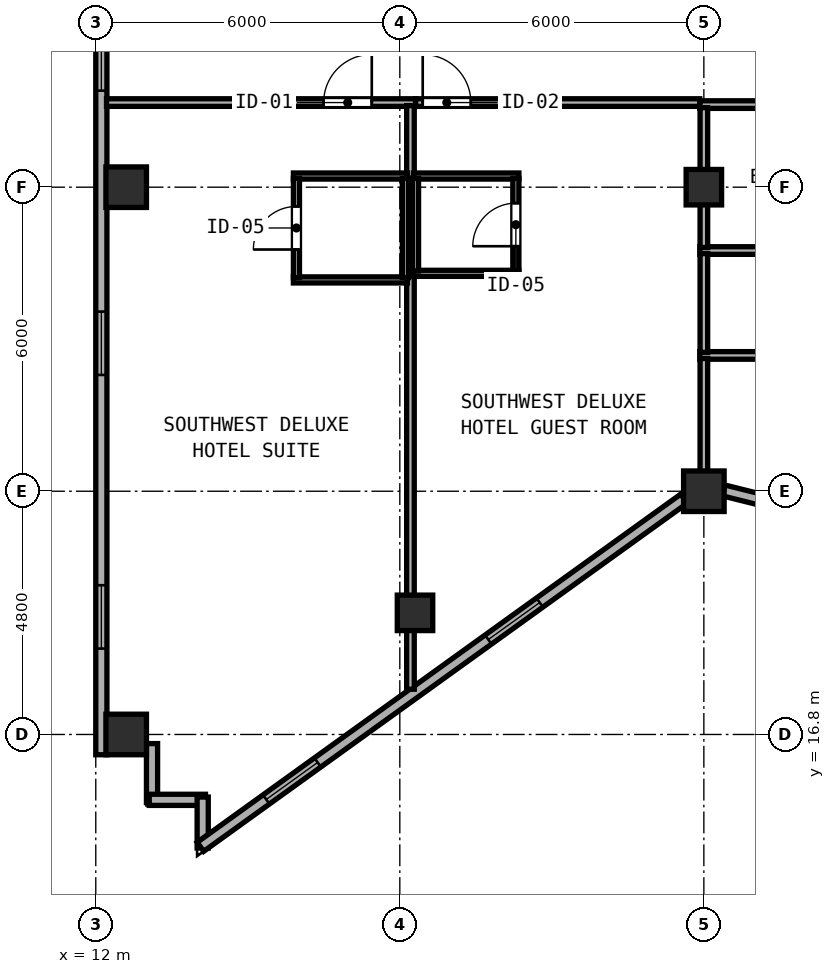
"""IFC4 building model, lengths in metres.
Left out: names, types, materials, properties, quantities, classifications, styles, units other than length and angle.
Written with IfcOpenShell. Run it as: python <this file> out.ifc"""

import sys

from ifc_helpers import new_model, si_unit, direction, frame, frame_2d, origin, origin_2d, place, context, subcontext, project, spatial, rectangle, hollow_rectangle, extrude, element, fill, save


model = new_model("IFC4")
c1 = context("Model", 3, precision=1e-05, world=origin(), true_north=direction((0.0, 1.0)))
c2 = subcontext(c1, "Body", "Model", "MODEL_VIEW")
j1 = project(units=[si_unit("LENGTHUNIT", "METRE"), si_unit("PLANEANGLEUNIT", "RADIAN")], contexts=[c1])
p1 = place(None, origin())
s1 = spatial("IfcSite", under=j1, at=p1, CompositionType="ELEMENT")
p2 = place(p1, origin())
s2 = spatial("IfcBuilding", under=s1, at=p2, CompositionType="ELEMENT")
p3 = place(p2, frame((0.0, 0.0, 235.2)))
s3 = spatial("IfcBuildingStorey", under=s2, at=p3, CompositionType="ELEMENT", Elevation=235.2)
for number, where, z_axis, x_axis in (
    (1, (24.0, 21.6, 0.0), (0.0, 0.0, 1.0), (1.0, 0.0, 0.0)),
    (2, (12.6, 16.8, 0.0), (0.0, 0.0, 1.0), (1.0, 0.0, 0.0)),
    (3, (12.6, 27.6, 0.0), (0.0, 0.0, 1.0), (1.0, 0.0, 0.0)),
):
    element("IfcColumn", number, at=place(p3, frame(where, z_axis=z_axis, x_axis=x_axis)), inside=s3, PredefinedType="COLUMN", context=c2, shape_type="SweptSolid", body=[
        extrude(hollow_rectangle(XDim=0.8, YDim=0.8, WallThickness=0.03, at=origin_2d()), origin(), (0.0, 0.0, 1.0), 3.85),
    ])
for number, where, z_axis, x_axis in (
    (4, (24.0, 27.6, 0.0), (0.0, 0.0, 1.0), (1.0, 0.0, 0.0)),
    (5, (18.3, 19.2, 0.0), (0.0, 0.0, 1.0), (1.0, 0.0, 0.0)),
):
    element("IfcColumn", number, at=place(p3, frame(where, z_axis=z_axis, x_axis=x_axis)), inside=s3, PredefinedType="COLUMN", context=c2, shape_type="SweptSolid", body=[
        extrude(hollow_rectangle(XDim=0.7, YDim=0.7, WallThickness=0.026, at=origin_2d()), origin(), (0.0, 0.0, 1.0), 3.85),
    ])
p4 = place(p3, frame((12.11, 37.545, 0.0), z_axis=(0.0, 0.0, 1.0), x_axis=(0.0, -1.0, 0.0)))
e6 = element("IfcWall", 6, at=p4, inside=s3, PredefinedType="SOLIDWALL", context=c2, shape_type="SweptSolid", body=[
    extrude(rectangle(XDim=21.145, YDim=0.22, at=frame_2d((10.573, 0.0))), origin(), (0.0, 0.0, 1.0), 3.67),
])
p5 = place(p4, frame((1.6, 0.0, 0.85)))
e7 = element("IfcOpeningElement", 7, at=p5, cuts=e6, PredefinedType="OPENING", context=c2, shape_type="SweptSolid", body=[
    extrude(rectangle(XDim=1.25, YDim=1.95, at=frame_2d((0.625, 0.975))), frame((0.0, 0.12, 0.0), z_axis=(0.0, -1.0, 0.0), x_axis=(1.0, 0.0, 0.0)), (0.0, 0.0, 1.0), 0.24),
])
p6 = place(p4, frame((6.79, 0.0, 0.85)))
e8 = element("IfcOpeningElement", 8, at=p6, cuts=e6, PredefinedType="OPENING", context=c2, shape_type="SweptSolid", body=[
    extrude(rectangle(XDim=1.25, YDim=1.95, at=frame_2d((0.625, 0.975))), frame((0.0, 0.12, 0.0), z_axis=(0.0, -1.0, 0.0), x_axis=(1.0, 0.0, 0.0)), (0.0, 0.0, 1.0), 0.24),
])
p7 = place(p4, frame((12.4, 0.0, 0.85)))
e9 = element("IfcOpeningElement", 9, at=p7, cuts=e6, PredefinedType="OPENING", context=c2, shape_type="SweptSolid", body=[
    extrude(rectangle(XDim=1.25, YDim=1.95, at=frame_2d((0.625, 0.975))), frame((0.0, 0.12, 0.0), z_axis=(0.0, -1.0, 0.0), x_axis=(1.0, 0.0, 0.0)), (0.0, 0.0, 1.0), 0.24),
])
p8 = place(p4, frame((17.8, 0.0, 0.85)))
e10 = element("IfcOpeningElement", 10, at=p8, cuts=e6, PredefinedType="OPENING", context=c2, shape_type="SweptSolid", body=[
    extrude(rectangle(XDim=1.25, YDim=1.95, at=frame_2d((0.625, 0.975))), frame((0.0, 0.12, 0.0), z_axis=(0.0, -1.0, 0.0), x_axis=(1.0, 0.0, 0.0)), (0.0, 0.0, 1.0), 0.24),
])
p9 = place(p3, frame((13.11, 16.62, 0.0), z_axis=(0.0, 0.0, 1.0), x_axis=(0.0, -1.0, 0.0)))
e11 = element("IfcWall", 11, at=p9, inside=s3, PredefinedType="SOLIDWALL", context=c2, shape_type="SweptSolid", body=[
    extrude(rectangle(XDim=1.165, YDim=0.22, at=frame_2d((0.583, 0.0))), origin(), (0.0, 0.0, 1.0), 3.67),
])
p10 = place(p3, frame((13.055, 15.51, 0.0), z_axis=(0.0, 0.0, 1.0), x_axis=(1.0, 0.0, 0.0)))
e12 = element("IfcWall", 12, at=p10, inside=s3, PredefinedType="SOLIDWALL", context=c2, shape_type="SweptSolid", body=[
    extrude(rectangle(XDim=1.11, YDim=0.22, at=frame_2d((0.555, 0.0))), origin(), (0.0, 0.0, 1.0), 3.67),
])
p11 = place(p3, frame((14.11, 15.565, 0.0), z_axis=(0.0, 0.0, 1.0), x_axis=(0.0, -1.0, 0.0)))
e13 = element("IfcWall", 13, at=p11, inside=s3, PredefinedType="SOLIDWALL", context=c2, shape_type="SweptSolid", body=[
    extrude(rectangle(XDim=1.005, YDim=0.22, at=frame_2d((0.502, 0.0))), origin(), (0.0, 0.0, 1.0), 3.67),
])
p12 = place(p3, frame((14.065, 14.583, 0.0), z_axis=(0.0, 0.0, 1.0), x_axis=(0.811523708458, 0.584319493608, 0.0)))
e14 = element("IfcWall", 14, at=p12, inside=s3, PredefinedType="SOLIDWALL", context=c2, shape_type="SweptSolid", body=[
    extrude(rectangle(XDim=11.759, YDim=0.22, at=frame_2d((5.879, 0.0))), origin(), (0.0, 0.0, 1.0), 3.315),
])
p13 = place(p12, frame((1.6, 0.0, 0.85)))
e15 = element("IfcOpeningElement", 15, at=p13, cuts=e14, PredefinedType="OPENING", context=c2, shape_type="SweptSolid", body=[
    extrude(rectangle(XDim=1.25, YDim=1.95, at=frame_2d((0.625, 0.975))), frame((0.0, 0.12, 0.0), z_axis=(0.0, -1.0, 0.0), x_axis=(1.0, 0.0, 0.0)), (0.0, 0.0, 1.0), 0.24),
])
p14 = place(p12, frame((7.0, 0.0, 0.85)))
e16 = element("IfcOpeningElement", 16, at=p14, cuts=e14, PredefinedType="OPENING", context=c2, shape_type="SweptSolid", body=[
    extrude(rectangle(XDim=1.25, YDim=1.95, at=frame_2d((0.625, 0.975))), frame((0.0, 0.12, 0.0), z_axis=(0.0, -1.0, 0.0), x_axis=(1.0, 0.0, 0.0)), (0.0, 0.0, 1.0), 0.24),
])
p15 = place(p3, frame((24.392, 21.615, 0.0), z_axis=(0.0, 0.0, 1.0), x_axis=(0.970133159038, -0.242572986408, 0.0)))
e17 = element("IfcWall", 17, at=p15, inside=s3, PredefinedType="SOLIDWALL", context=c2, shape_type="SweptSolid", body=[
    extrude(rectangle(XDim=4.613, YDim=0.22, at=frame_2d((2.306, 0.0))), origin(), (0.0, 0.0, 1.0), 3.315),
])
p16 = place(p15, frame((1.6, 0.0, 0.85)))
e18 = element("IfcOpeningElement", 18, at=p16, cuts=e17, PredefinedType="OPENING", context=c2, shape_type="SweptSolid", body=[
    extrude(rectangle(XDim=1.25, YDim=1.95, at=frame_2d((0.625, 0.975))), frame((0.0, 0.12, 0.0), z_axis=(0.0, -1.0, 0.0), x_axis=(1.0, 0.0, 0.0)), (0.0, 0.0, 1.0), 0.24),
])
for number, where, z_axis, x_axis in (
    (19, (23.92, 29.23, 0.0), (0.0, 0.0, 1.0), (1.0, 0.0, 0.0)),
    (20, (23.92, 26.35, 0.0), (0.0, 0.0, 1.0), (1.0, 0.0, 0.0)),
):
    element("IfcWall", number, at=place(p3, frame(where, z_axis=z_axis, x_axis=x_axis)), inside=s3, PredefinedType="PARTITIONING", context=c2, shape_type="SweptSolid", body=[
        extrude(rectangle(XDim=4.04, YDim=0.15, at=frame_2d((2.02, 0.0))), origin(), (0.0, 0.0, 1.0), 3.67),
    ])
p17 = place(p3, frame((24.0, 26.41, 0.0), z_axis=(0.0, 0.0, 1.0), x_axis=(0.0, 1.0, 0.0)))
e21 = element("IfcWall", 21, at=p17, inside=s3, PredefinedType="PARTITIONING", context=c2, shape_type="SweptSolid", body=[
    extrude(rectangle(XDim=2.76, YDim=0.15, at=frame_2d((1.38, 0.0))), origin(), (0.0, 0.0, 1.0), 3.315),
])
p18 = place(p3, frame((23.92, 24.28, 0.0), z_axis=(0.0, 0.0, 1.0), x_axis=(1.0, 0.0, 0.0)))
e22 = element("IfcWall", 22, at=p18, inside=s3, PredefinedType="PARTITIONING", context=c2, shape_type="SweptSolid", body=[
    extrude(rectangle(XDim=7.36, YDim=0.15, at=frame_2d((3.68, 0.0))), origin(), (0.0, 0.0, 1.0), 3.67),
])
p19 = place(p18, frame((5.97, 0.0, 0.0), z_axis=(0.0, 0.0, 1.0), x_axis=(-1.0, 0.0, 0.0)))
e23 = element("IfcOpeningElement", 23, at=p19, cuts=e22, PredefinedType="OPENING", context=c2, shape_type="SweptSolid", body=[
    extrude(rectangle(XDim=0.95, YDim=2.12, at=frame_2d((0.475, 1.06))), frame((0.0, 0.085, 0.0), z_axis=(0.0, -1.0, 0.0), x_axis=(1.0, 0.0, 0.0)), (0.0, 0.0, 1.0), 0.17),
])
p20 = place(p3, frame((24.0, 21.819, 0.0), z_axis=(0.0, 0.0, 1.0), x_axis=(0.0, 1.0, 0.0)))
e24 = element("IfcWall", 24, at=p20, inside=s3, PredefinedType="PARTITIONING", context=c2, shape_type="SweptSolid", body=[
    extrude(rectangle(XDim=2.401, YDim=0.15, at=frame_2d((1.201, 0.0))), origin(), (0.0, 0.0, 1.0), 3.315),
])
p21 = place(p3, frame((12.212, 29.27, 0.0), z_axis=(0.0, 0.0, 1.0), x_axis=(1.0, 0.0, 0.0)))
e25 = element("IfcWall", 25, at=p21, inside=s3, PredefinedType="PARTITIONING", context=c2, shape_type="SweptSolid", body=[
    extrude(rectangle(XDim=6.098, YDim=0.15, at=frame_2d((3.049, 0.0))), origin(), (0.0, 0.0, 1.0), 3.67),
])
p22 = place(p21, frame((5.235, 0.0, 0.0), z_axis=(0.0, 0.0, 1.0), x_axis=(-1.0, 0.0, 0.0)))
e26 = element("IfcOpeningElement", 26, at=p22, cuts=e25, PredefinedType="OPENING", context=c2, shape_type="SweptSolid", body=[
    extrude(rectangle(XDim=0.95, YDim=2.18, at=frame_2d((0.475, 1.09))), frame((0.0, 0.085, 0.0), z_axis=(0.0, -1.0, 0.0), x_axis=(1.0, 0.0, 0.0)), (0.0, 0.0, 1.0), 0.17),
])
p23 = place(p3, frame((18.21, 17.692, 0.0), z_axis=(0.0, 0.0, 1.0), x_axis=(0.0, 1.0, 0.0)))
e27 = element("IfcWall", 27, at=p23, inside=s3, PredefinedType="PARTITIONING", context=c2, shape_type="SweptSolid", body=[
    extrude(rectangle(XDim=11.518, YDim=0.15, at=frame_2d((5.759, 0.0))), origin(), (0.0, 0.0, 1.0), 3.67),
])
for number, where, z_axis, x_axis in (
    (28, (15.9, 27.82, 0.0), (0.0, 0.0, 1.0), (1.0, 0.0, 0.0)),
    (29, (15.9, 25.77, 0.0), (0.0, 0.0, 1.0), (1.0, 0.0, 0.0)),
):
    element("IfcWall", number, at=place(p3, frame(where, z_axis=z_axis, x_axis=x_axis)), inside=s3, PredefinedType="PARTITIONING", context=c2, shape_type="SweptSolid", body=[
        extrude(rectangle(XDim=2.25, YDim=0.12, at=frame_2d((1.125, 0.0))), origin(), (0.0, 0.0, 1.0), 3.67),
    ])
p24 = place(p3, frame((15.96, 25.815, 0.0), z_axis=(0.0, 0.0, 1.0), x_axis=(0.0, 1.0, 0.0)))
e30 = element("IfcWall", 30, at=p24, inside=s3, PredefinedType="PARTITIONING", context=c2, shape_type="SweptSolid", body=[
    extrude(rectangle(XDim=1.96, YDim=0.12, at=frame_2d((0.98, 0.0))), origin(), (0.0, 0.0, 1.0), 3.67),
])
p25 = place(p24, frame((1.405, 0.0, 0.0), z_axis=(0.0, 0.0, 1.0), x_axis=(-1.0, 0.0, 0.0)))
e31 = element("IfcOpeningElement", 31, at=p25, cuts=e30, PredefinedType="OPENING", context=c2, shape_type="SweptSolid", body=[
    extrude(rectangle(XDim=0.85, YDim=2.1, at=frame_2d((0.425, 1.05))), frame((0.0, 0.07, 0.0), z_axis=(0.0, -1.0, 0.0), x_axis=(1.0, 0.0, 0.0)), (0.0, 0.0, 1.0), 0.14),
])
p26 = place(p3, frame((18.11, 25.815, 0.0), z_axis=(0.0, 0.0, 1.0), x_axis=(0.0, 1.0, 0.0)))
e32 = element("IfcWall", 32, at=p26, inside=s3, PredefinedType="PARTITIONING", context=c2, shape_type="SweptSolid", body=[
    extrude(rectangle(XDim=1.96, YDim=0.12, at=frame_2d((0.98, 0.0))), origin(), (0.0, 0.0, 1.0), 3.67),
])
p27 = place(p3, frame((18.312, 29.27, 0.0), z_axis=(0.0, 0.0, 1.0), x_axis=(1.0, 0.0, 0.0)))
e33 = element("IfcWall", 33, at=p27, inside=s3, PredefinedType="PARTITIONING", context=c2, shape_type="SweptSolid", body=[
    extrude(rectangle(XDim=5.606, YDim=0.15, at=frame_2d((2.803, 0.0))), origin(), (0.0, 0.0, 1.0), 3.67),
])
p28 = place(p27, frame((1.09, 0.0, 0.0), z_axis=(0.0, 0.0, 1.0), x_axis=(-1.0, 0.0, 0.0)))
e34 = element("IfcOpeningElement", 34, at=p28, cuts=e33, PredefinedType="OPENING", context=c2, shape_type="SweptSolid", body=[
    extrude(rectangle(XDim=0.95, YDim=2.15, at=frame_2d((0.475, 1.075))), frame((0.0, 0.085, 0.0), z_axis=(0.0, -1.0, 0.0), x_axis=(1.0, 0.0, 0.0)), (0.0, 0.0, 1.0), 0.17),
])
p29 = place(p3, frame((24.0, 24.34, 0.0), z_axis=(0.0, 0.0, 1.0), x_axis=(0.0, 1.0, 0.0)))
e35 = element("IfcWall", 35, at=p29, inside=s3, PredefinedType="PARTITIONING", context=c2, shape_type="SweptSolid", body=[
    extrude(rectangle(XDim=1.95, YDim=0.15, at=frame_2d((0.975, 0.0))), origin(), (0.0, 0.0, 1.0), 3.315),
])
for number, where, z_axis, x_axis in (
    (36, (18.27, 27.82, 0.0), (0.0, 0.0, 1.0), (1.0, 0.0, 0.0)),
    (37, (18.27, 25.9, 0.0), (0.0, 0.0, 1.0), (1.0, 0.0, 0.0)),
):
    element("IfcWall", number, at=place(p3, frame(where, z_axis=z_axis, x_axis=x_axis)), inside=s3, PredefinedType="PARTITIONING", context=c2, shape_type="SweptSolid", body=[
        extrude(rectangle(XDim=2.08, YDim=0.12, at=frame_2d((1.04, 0.0))), origin(), (0.0, 0.0, 1.0), 3.67),
    ])
p30 = place(p3, frame((18.31, 25.945, 0.0), z_axis=(0.0, 0.0, 1.0), x_axis=(0.0, 1.0, 0.0)))
e38 = element("IfcWall", 38, at=p30, inside=s3, PredefinedType="PARTITIONING", context=c2, shape_type="SweptSolid", body=[
    extrude(rectangle(XDim=1.83, YDim=0.12, at=frame_2d((0.915, 0.0))), origin(), (0.0, 0.0, 1.0), 3.67),
])
p31 = place(p3, frame((20.29, 25.945, 0.0), z_axis=(0.0, 0.0, 1.0), x_axis=(0.0, 1.0, 0.0)))
e39 = element("IfcWall", 39, at=p31, inside=s3, PredefinedType="PARTITIONING", context=c2, shape_type="SweptSolid", body=[
    extrude(rectangle(XDim=1.83, YDim=0.12, at=frame_2d((0.915, 0.0))), origin(), (0.0, 0.0, 1.0), 3.67),
])
p32 = place(p31, frame((0.49, 0.0, 0.0)))
e40 = element("IfcOpeningElement", 40, at=p32, cuts=e39, PredefinedType="OPENING", context=c2, shape_type="SweptSolid", body=[
    extrude(rectangle(XDim=0.85, YDim=2.1, at=frame_2d((0.425, 1.05))), frame((0.0, 0.07, 0.0), z_axis=(0.0, -1.0, 0.0), x_axis=(1.0, 0.0, 0.0)), (0.0, 0.0, 1.0), 0.14),
])
p33 = place(p6, origin())
e41 = element("IfcWindow", 41, at=p33, inside=s3, PartitioningType="SINGLE_PANEL", PredefinedType="WINDOW", context=c2, shape_type="SweptSolid", body=[
    extrude(rectangle(XDim=1.25, YDim=1.95, at=frame_2d((0.625, 0.975))), frame((0.0, 0.03, 0.0), z_axis=(0.0, -1.0, 0.0), x_axis=(1.0, 0.0, 0.0)), (0.0, 0.0, 1.0), 0.06),
])
fill(e8, e41)
p34 = place(p7, origin())
e42 = element("IfcWindow", 42, at=p34, inside=s3, PartitioningType="SINGLE_PANEL", PredefinedType="WINDOW", context=c2, shape_type="SweptSolid", body=[
    extrude(rectangle(XDim=1.25, YDim=1.95, at=frame_2d((0.625, 0.975))), frame((0.0, 0.03, 0.0), z_axis=(0.0, -1.0, 0.0), x_axis=(1.0, 0.0, 0.0)), (0.0, 0.0, 1.0), 0.06),
])
fill(e9, e42)
p35 = place(p8, origin())
e43 = element("IfcWindow", 43, at=p35, inside=s3, PartitioningType="SINGLE_PANEL", PredefinedType="WINDOW", context=c2, shape_type="SweptSolid", body=[
    extrude(rectangle(XDim=1.25, YDim=1.95, at=frame_2d((0.625, 0.975))), frame((0.0, 0.03, 0.0), z_axis=(0.0, -1.0, 0.0), x_axis=(1.0, 0.0, 0.0)), (0.0, 0.0, 1.0), 0.06),
])
fill(e10, e43)
p36 = place(p13, origin())
e44 = element("IfcWindow", 44, at=p36, inside=s3, PartitioningType="SINGLE_PANEL", PredefinedType="WINDOW", context=c2, shape_type="SweptSolid", body=[
    extrude(rectangle(XDim=1.25, YDim=1.95, at=frame_2d((0.625, 0.975))), frame((0.0, 0.03, 0.0), z_axis=(0.0, -1.0, 0.0), x_axis=(1.0, 0.0, 0.0)), (0.0, 0.0, 1.0), 0.06),
])
fill(e15, e44)
p37 = place(p14, origin())
e45 = element("IfcWindow", 45, at=p37, inside=s3, PartitioningType="SINGLE_PANEL", PredefinedType="WINDOW", context=c2, shape_type="SweptSolid", body=[
    extrude(rectangle(XDim=1.25, YDim=1.95, at=frame_2d((0.625, 0.975))), frame((0.0, 0.03, 0.0), z_axis=(0.0, -1.0, 0.0), x_axis=(1.0, 0.0, 0.0)), (0.0, 0.0, 1.0), 0.06),
])
fill(e16, e45)
p38 = place(p22, origin())
e46 = element("IfcDoor", 46, at=p38, inside=s3, OperationType="SINGLE_SWING_LEFT", PredefinedType="DOOR", context=c2, shape_type="SweptSolid", body=[
    extrude(rectangle(XDim=0.95, YDim=2.18, at=frame_2d((0.475, 1.09))), frame((0.0, 0.025, 0.0), z_axis=(0.0, -1.0, 0.0), x_axis=(1.0, 0.0, 0.0)), (0.0, 0.0, 1.0), 0.05),
])
fill(e26, e46)
p39 = place(p25, origin())
e47 = element("IfcDoor", 47, at=p39, inside=s3, OperationType="SINGLE_SWING_RIGHT", PredefinedType="DOOR", context=c2, shape_type="SweptSolid", body=[
    extrude(rectangle(XDim=0.85, YDim=2.1, at=frame_2d((0.425, 1.05))), frame((0.0, 0.025, 0.0), z_axis=(0.0, -1.0, 0.0), x_axis=(1.0, 0.0, 0.0)), (0.0, 0.0, 1.0), 0.05),
])
fill(e31, e47)
p40 = place(p28, origin())
e48 = element("IfcDoor", 48, at=p40, inside=s3, OperationType="SINGLE_SWING_RIGHT", PredefinedType="DOOR", context=c2, shape_type="SweptSolid", body=[
    extrude(rectangle(XDim=0.95, YDim=2.15, at=frame_2d((0.475, 1.075))), frame((0.0, 0.025, 0.0), z_axis=(0.0, -1.0, 0.0), x_axis=(1.0, 0.0, 0.0)), (0.0, 0.0, 1.0), 0.05),
])
fill(e34, e48)
p41 = place(p32, origin())
e49 = element("IfcDoor", 49, at=p41, inside=s3, OperationType="SINGLE_SWING_LEFT", PredefinedType="DOOR", context=c2, shape_type="SweptSolid", body=[
    extrude(rectangle(XDim=0.85, YDim=2.1, at=frame_2d((0.425, 1.05))), frame((0.0, 0.025, 0.0), z_axis=(0.0, -1.0, 0.0), x_axis=(1.0, 0.0, 0.0)), (0.0, 0.0, 1.0), 0.05),
])
fill(e40, e49)
save(model, sys.argv[1])
